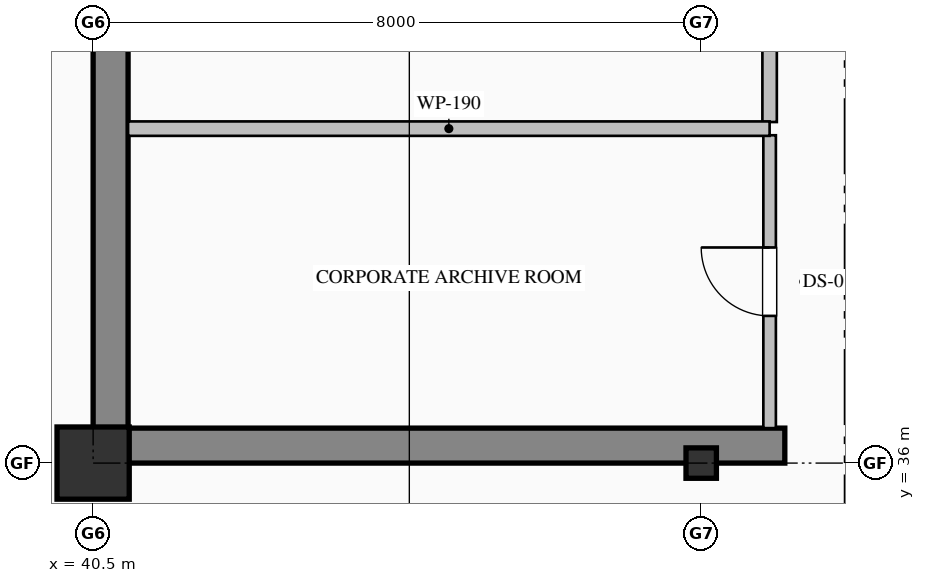
"""IFC4 building model, lengths in metres.
Left out: names, types, materials, properties, quantities, classifications, styles, units other than length and angle.
Written with IfcOpenShell. Run it as: python <this file> out.ifc"""

import sys

from ifc_helpers import new_model, si_unit, direction, frame, frame_2d, origin, origin_2d, place, context, subcontext, project, spatial, rectangle, hollow_rectangle, i_section, extrude, element, fill, save


model = new_model("IFC4")
c1 = context("Model", 3, precision=1e-05, world=origin(), true_north=direction((0.0, 1.0)))
c2 = subcontext(c1, "Body", "Model", "MODEL_VIEW")
j1 = project(units=[si_unit("LENGTHUNIT", "METRE"), si_unit("PLANEANGLEUNIT", "RADIAN")], contexts=[c1])
p1 = place(None, origin())
s1 = spatial("IfcSite", under=j1, at=p1, CompositionType="ELEMENT")
p2 = place(p1, origin())
s2 = spatial("IfcBuilding", under=s1, at=p2, CompositionType="ELEMENT")
p3 = place(p2, frame((0.0, 0.0, 200.4)))
s3 = spatial("IfcBuildingStorey", under=s2, at=p3, CompositionType="ELEMENT", Elevation=200.4)
p4 = place(p3, frame((40.73, 36.46, 0.0), z_axis=(0.0, 0.0, 1.0), x_axis=(0.0, 1.0, 0.0)))
e1 = element("IfcWall", 1, at=p4, inside=s3, PredefinedType="SHEAR", context=c2, shape_type="SweptSolid", body=[
    extrude(rectangle(XDim=7.94, YDim=0.46, at=frame_2d((3.97, 0.0))), origin(), (0.0, 0.0, 1.0), 5.175),
])
p5 = place(p3, frame((40.5, 36.23, 0.0), z_axis=(0.0, 0.0, 1.0), x_axis=(1.0, 0.0, 0.0)))
e2 = element("IfcWall", 2, at=p5, inside=s3, PredefinedType="SHEAR", context=c2, shape_type="SweptSolid", body=[
    extrude(rectangle(XDim=9.1, YDim=0.46, at=frame_2d((4.55, 0.0))), origin(), (0.0, 0.0, 1.0), 5.175),
])
p6 = place(p3, frame((40.5, 36.0, 0.0), z_axis=(0.0, 0.0, 1.0), x_axis=(1.0, 0.0, 0.0)))
e3 = element("IfcColumn", 3, at=p6, inside=s3, PredefinedType="COLUMN", context=c2, shape_type="SweptSolid", body=[
    extrude(hollow_rectangle(XDim=0.95, YDim=0.95, WallThickness=0.036, at=origin_2d()), origin(), (0.0, 0.0, 1.0), 5.4),
])
p7 = place(p3, frame((48.5, 36.0, 0.0), z_axis=(0.0, 0.0, 1.0), x_axis=(1.0, 0.0, 0.0)))
e4 = element("IfcColumn", 4, at=p7, inside=s3, PredefinedType="COLUMN", context=c2, shape_type="SweptSolid", body=[
    extrude(i_section(OverallWidth=0.4, OverallDepth=0.4, WebThickness=0.013, FlangeThickness=0.021, FilletRadius=0.022, at=origin_2d()), origin(), (0.0, 0.0, 1.0), 5.4),
])
p8 = place(p3, frame((49.4, 36.46, 0.0), z_axis=(0.0, 0.0, 1.0), x_axis=(0.0, 1.0, 0.0)))
e5 = element("IfcWall", 5, at=p8, inside=s3, PredefinedType="PARTITIONING", context=c2, shape_type="SweptSolid", body=[
    extrude(rectangle(XDim=3.853, YDim=0.165, at=frame_2d((1.927, 0.0))), origin(), (0.0, 0.0, 1.0), 4.417),
])
p9 = place(p8, frame((1.477, 0.0, 0.0)))
e6 = element("IfcOpeningElement", 6, at=p9, cuts=e5, PredefinedType="OPENING", context=c2, shape_type="SweptSolid", body=[
    extrude(rectangle(XDim=0.9, YDim=2.15, at=frame_2d((0.45, 1.075))), frame((0.0, 0.093, 0.0), z_axis=(0.0, -1.0, 0.0), x_axis=(1.0, 0.0, 0.0)), (0.0, 0.0, 1.0), 0.185),
])
p10 = place(p3, frame((49.4, 40.487, 0.0), z_axis=(0.0, 0.0, 1.0), x_axis=(0.0, 1.0, 0.0)))
e7 = element("IfcWall", 7, at=p10, inside=s3, PredefinedType="PARTITIONING", context=c2, shape_type="SweptSolid", body=[
    extrude(rectangle(XDim=3.663, YDim=0.19, at=frame_2d((1.832, 0.0))), origin(), (0.0, 0.0, 1.0), 4.417),
])
p11 = place(p10, frame((1.132, 0.0, 0.0)))
e8 = element("IfcOpeningElement", 8, at=p11, cuts=e7, PredefinedType="OPENING", context=c2, shape_type="SweptSolid", body=[
    extrude(rectangle(XDim=1.4, YDim=2.25, at=frame_2d((0.7, 1.125))), frame((0.0, 0.105, 0.0), z_axis=(0.0, -1.0, 0.0), x_axis=(1.0, 0.0, 0.0)), (0.0, 0.0, 1.0), 0.21),
])
p12 = place(p3, frame((40.96, 40.4, 0.0), z_axis=(0.0, 0.0, 1.0), x_axis=(1.0, 0.0, 0.0)))
e9 = element("IfcWall", 9, at=p12, inside=s3, PredefinedType="PARTITIONING", context=c2, shape_type="SweptSolid", body=[
    extrude(rectangle(XDim=8.44, YDim=0.19, at=frame_2d((4.22, 0.0))), origin(), (0.0, 0.0, 1.0), 5.175),
])
p13 = place(p9, origin())
e10 = element("IfcDoor", 10, at=p13, inside=s3, OperationType="SINGLE_SWING_RIGHT", PredefinedType="DOOR", context=c2, shape_type="SweptSolid", body=[
    extrude(rectangle(XDim=0.9, YDim=2.15, at=frame_2d((0.45, 1.075))), frame((0.0, 0.025, 0.0), z_axis=(0.0, -1.0, 0.0), x_axis=(1.0, 0.0, 0.0)), (0.0, 0.0, 1.0), 0.05),
])
fill(e6, e10)
save(model, sys.argv[1])
